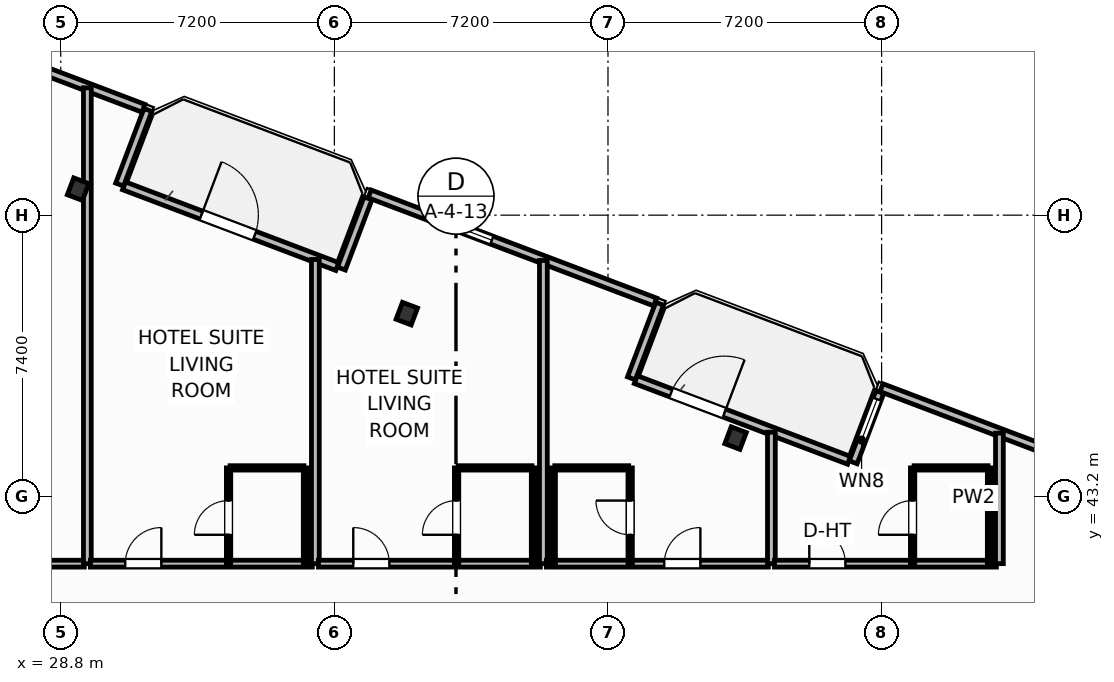
"""IFC4 building model, lengths in metres.
Left out: names, types, materials, properties, quantities, classifications, styles, units other than length and angle.
Written with IfcOpenShell. Run it as: python <this file> out.ifc"""

import sys

from ifc_helpers import new_model, si_unit, direction, frame, frame_2d, origin, origin_2d, place, context, subcontext, project, spatial, rectangle, i_section, extrude, element, fill, save


model = new_model("IFC4")
c1 = context("Model", 3, precision=1e-05, world=origin(), true_north=direction((0.0, 1.0)))
c2 = subcontext(c1, "Body", "Model", "MODEL_VIEW")
j1 = project(units=[si_unit("LENGTHUNIT", "METRE"), si_unit("PLANEANGLEUNIT", "RADIAN")], contexts=[c1])
p1 = place(None, origin())
s1 = spatial("IfcSite", under=j1, at=p1, CompositionType="ELEMENT")
p2 = place(p1, origin())
s2 = spatial("IfcBuilding", under=s1, at=p2, CompositionType="ELEMENT")
p3 = place(p2, frame((0.0, 0.0, 91.0)))
s3 = spatial("IfcBuildingStorey", under=s2, at=p3, CompositionType="ELEMENT", Elevation=91.0)
for number, where, z_axis, x_axis in (
    (1, (46.557, 44.734, 0.0), (0.0, 0.0, 1.0), (0.935, -0.354, 0.0)),
    (2, (37.906, 48.009, 0.0), (0.0, 0.0, 1.0), (0.935, -0.354, 0.0)),
    (3, (29.256, 51.284, 0.0), (0.0, 0.0, 1.0), (0.935, -0.354, 0.0)),
):
    element("IfcColumn", number, at=place(p3, frame(where, z_axis=z_axis, x_axis=x_axis)), inside=s3, PredefinedType="COLUMN", context=c2, shape_type="SweptSolid", body=[
        extrude(i_section(OverallWidth=0.424, OverallDepth=0.474, WebThickness=0.048, FlangeThickness=0.077, FilletRadius=0.025, at=origin_2d()), origin(), (0.0, 0.0, 1.0), 3.7),
    ])
p4 = place(p3, frame((30.465, 51.372, 0.0), z_axis=(0.0, 0.0, 1.0), x_axis=(0.935227640088, -0.354046976001, 0.0)))
e4 = element("IfcWall", 4, at=p4, inside=s3, PredefinedType="SOLIDWALL", context=c2, shape_type="SweptSolid", body=[
    extrude(rectangle(XDim=6.0, YDim=0.22, at=frame_2d((3.0, 0.0))), origin(), (0.0, 0.0, 1.0), 2.73),
])
p5 = place(p4, frame((2.176, 0.0, 0.0)))
e5 = element("IfcOpeningElement", 5, at=p5, cuts=e4, PredefinedType="OPENING", context=c2, shape_type="SweptSolid", body=[
    extrude(rectangle(XDim=1.5, YDim=2.25, at=frame_2d((0.75, 1.125))), frame((0.0, 0.12, 0.0), z_axis=(0.0, -1.0, 0.0), x_axis=(1.0, 0.0, 0.0)), (0.0, 0.0, 1.0), 0.24),
])
p6 = place(p3, frame((43.932, 46.273, 0.0), z_axis=(0.0, 0.0, 1.0), x_axis=(0.93521416643, -0.354082565101, 0.0)))
e6 = element("IfcWall", 6, at=p6, inside=s3, PredefinedType="SOLIDWALL", context=c2, shape_type="SweptSolid", body=[
    extrude(rectangle(XDim=6.0, YDim=0.22, at=frame_2d((3.0, 0.0))), origin(), (0.0, 0.0, 1.0), 2.73),
])
p7 = place(p6, frame((0.992, 0.0, 0.0)))
e7 = element("IfcOpeningElement", 7, at=p7, cuts=e6, PredefinedType="OPENING", context=c2, shape_type="SweptSolid", body=[
    extrude(rectangle(XDim=1.5, YDim=2.25, at=frame_2d((0.75, 1.125))), frame((0.0, 0.12, 0.0), z_axis=(0.0, -1.0, 0.0), x_axis=(1.0, 0.0, 0.0)), (0.0, 0.0, 1.0), 0.24),
])
p8 = place(p3, frame((57.91, 43.216, 0.0), z_axis=(0.0, 0.0, 1.0), x_axis=(-0.935220736163, 0.354065212427, 0.0)))
e8 = element("IfcWall", 8, at=p8, inside=s3, PredefinedType="SOLIDWALL", context=c2, shape_type="SweptSolid", body=[
    extrude(rectangle(XDim=8.035, YDim=0.22, at=frame_2d((4.018, 0.0))), origin(), (0.0, 0.0, 1.0), 2.73),
])
p9 = place(p8, frame((1.788, 0.0, 0.8)))
e9 = element("IfcOpeningElement", 9, at=p9, cuts=e8, PredefinedType="OPENING", context=c2, shape_type="SweptSolid", body=[
    extrude(rectangle(XDim=1.65, YDim=1.65, at=frame_2d((0.825, 0.825))), frame((0.0, 0.12, 0.0), z_axis=(0.0, -1.0, 0.0), x_axis=(1.0, 0.0, 0.0)), (0.0, 0.0, 1.0), 0.24),
])
p10 = place(p3, frame((50.352, 45.944, 0.0), z_axis=(0.0, 0.0, 1.0), x_axis=(-0.354061611705, -0.935222099352, 0.0)))
e10 = element("IfcWall", 10, at=p10, inside=s3, PredefinedType="SOLIDWALL", context=c2, shape_type="SweptSolid", body=[
    extrude(rectangle(XDim=1.975, YDim=0.22, at=frame_2d((0.987, 0.0))), origin(), (0.0, 0.0, 1.0), 2.73),
])
p11 = place(p10, frame((0.2, 0.0, 0.8)))
e11 = element("IfcOpeningElement", 11, at=p11, cuts=e10, PredefinedType="OPENING", context=c2, shape_type="SweptSolid", body=[
    extrude(rectangle(XDim=1.15, YDim=1.4, at=frame_2d((0.575, 0.7))), frame((0.0, 0.12, 0.0), z_axis=(0.0, -1.0, 0.0), x_axis=(1.0, 0.0, 0.0)), (0.0, 0.0, 1.0), 0.24),
])
p12 = place(p3, frame((43.817, 46.306, 0.0), z_axis=(0.0, 0.0, 1.0), x_axis=(0.353988291547, 0.935249854022, 0.0)))
e12 = element("IfcWall", 12, at=p12, inside=s3, PredefinedType="SOLIDWALL", context=c2, shape_type="SweptSolid", body=[
    extrude(rectangle(XDim=2.1, YDim=0.22, at=frame_2d((1.05, 0.0))), origin(), (0.0, 0.0, 1.0), 2.73),
])
p13 = place(p3, frame((44.443, 48.314, 0.0), z_axis=(0.0, 0.0, 1.0), x_axis=(-0.935226988293, 0.354048697735, 0.0)))
e13 = element("IfcWall", 13, at=p13, inside=s3, PredefinedType="SOLIDWALL", context=c2, shape_type="SweptSolid", body=[
    extrude(rectangle(XDim=8.035, YDim=0.22, at=frame_2d((4.018, 0.0))), origin(), (0.0, 0.0, 1.0), 2.73),
])
p14 = place(p13, frame((4.597, 0.0, 0.8)))
e14 = element("IfcOpeningElement", 14, at=p14, cuts=e13, PredefinedType="OPENING", context=c2, shape_type="SweptSolid", body=[
    extrude(rectangle(XDim=1.65, YDim=1.65, at=frame_2d((0.825, 0.825))), frame((0.0, 0.12, 0.0), z_axis=(0.0, -1.0, 0.0), x_axis=(1.0, 0.0, 0.0)), (0.0, 0.0, 1.0), 0.24),
])
p15 = place(p3, frame((36.885, 51.042, 0.0), z_axis=(0.0, 0.0, 1.0), x_axis=(-0.354128791944, -0.935196663123, 0.0)))
e15 = element("IfcWall", 15, at=p15, inside=s3, PredefinedType="SOLIDWALL", context=c2, shape_type="SweptSolid", body=[
    extrude(rectangle(XDim=1.975, YDim=0.22, at=frame_2d((0.988, 0.0))), origin(), (0.0, 0.0, 1.0), 2.73),
])
p16 = place(p3, frame((30.349, 51.405, 0.0), z_axis=(0.0, 0.0, 1.0), x_axis=(0.354128469405, 0.935196785258, 0.0)))
e16 = element("IfcWall", 16, at=p16, inside=s3, PredefinedType="SOLIDWALL", context=c2, shape_type="SweptSolid", body=[
    extrude(rectangle(XDim=2.1, YDim=0.22, at=frame_2d((1.05, 0.0))), origin(), (0.0, 0.0, 1.0), 2.73),
])
p17 = place(p3, frame((30.976, 53.413, 0.0), z_axis=(0.0, 0.0, 1.0), x_axis=(-0.935220327379, 0.354066292178, 0.0)))
e17 = element("IfcWall", 17, at=p17, inside=s3, PredefinedType="SOLIDWALL", context=c2, shape_type="SweptSolid", body=[
    extrude(rectangle(XDim=14.347, YDim=0.22, at=frame_2d((7.174, 0.0))), origin(), (0.0, 0.0, 1.0), 2.73),
])
p18 = place(p17, frame((3.555, 0.0, 0.8)))
e18 = element("IfcOpeningElement", 18, at=p18, cuts=e17, PredefinedType="OPENING", context=c2, shape_type="SweptSolid", body=[
    extrude(rectangle(XDim=1.65, YDim=1.65, at=frame_2d((0.825, 0.825))), frame((0.0, 0.12, 0.0), z_axis=(0.0, -1.0, 0.0), x_axis=(1.0, 0.0, 0.0)), (0.0, 0.0, 1.0), 0.24),
])
p19 = place(p3, frame((23.58, 41.43, 0.0), z_axis=(0.0, 0.0, 1.0), x_axis=(1.0, 0.0, 0.0)))
e19 = element("IfcWall", 19, at=p19, inside=s3, PredefinedType="PARTITIONING", context=c2, shape_type="SweptSolid", body=[
    extrude(rectangle(XDim=5.84, YDim=0.18, at=frame_2d((2.92, 0.0))), origin(), (0.0, 0.0, 1.0), 3.45),
])
p20 = place(p19, frame((3.101, 0.0, 0.0)))
e20 = element("IfcOpeningElement", 20, at=p20, cuts=e19, PredefinedType="OPENING", context=c2, shape_type="SweptSolid", body=[
    extrude(rectangle(XDim=0.95, YDim=2.15, at=frame_2d((0.475, 1.075))), frame((0.0, 0.1, 0.0), z_axis=(0.0, -1.0, 0.0), x_axis=(1.0, 0.0, 0.0)), (0.0, 0.0, 1.0), 0.2),
])
p21 = place(p3, frame((29.5, 41.43, 0.0), z_axis=(0.0, 0.0, 1.0), x_axis=(0.0, 1.0, 0.0)))
e21 = element("IfcWall", 21, at=p21, inside=s3, PredefinedType="PARTITIONING", context=c2, shape_type="SweptSolid", body=[
    extrude(rectangle(XDim=12.52, YDim=0.205, at=frame_2d((6.26, 0.0))), origin(), (0.0, 0.0, 1.0), 2.58),
])
p22 = place(p3, frame((29.58, 41.43, 0.0), z_axis=(0.0, 0.0, 1.0), x_axis=(1.0, 0.0, 0.0)))
e22 = element("IfcWall", 22, at=p22, inside=s3, PredefinedType="PARTITIONING", context=c2, shape_type="SweptSolid", body=[
    extrude(rectangle(XDim=5.84, YDim=0.18, at=frame_2d((2.92, 0.0))), origin(), (0.0, 0.0, 1.0), 3.45),
])
p23 = place(p22, frame((0.917, 0.0, 0.0)))
e23 = element("IfcOpeningElement", 23, at=p23, cuts=e22, PredefinedType="OPENING", context=c2, shape_type="SweptSolid", body=[
    extrude(rectangle(XDim=0.95, YDim=2.15, at=frame_2d((0.475, 1.075))), frame((0.0, 0.1, 0.0), z_axis=(0.0, -1.0, 0.0), x_axis=(1.0, 0.0, 0.0)), (0.0, 0.0, 1.0), 0.2),
])
p24 = place(p3, frame((33.256, 43.95, 0.0), z_axis=(0.0, 0.0, 1.0), x_axis=(1.0, 0.0, 0.0)))
e24 = element("IfcWall", 24, at=p24, inside=s3, PredefinedType="PARTITIONING", context=c2, shape_type="SweptSolid", body=[
    extrude(rectangle(XDim=1.944, YDim=0.115, at=frame_2d((0.972, 0.0))), origin(), (0.0, 0.0, 1.0), 3.45),
])
p25 = place(p3, frame((33.216, 41.43, 0.0), z_axis=(0.0, 0.0, 1.0), x_axis=(0.0, 1.0, 0.0)))
e25 = element("IfcWall", 25, at=p25, inside=s3, PredefinedType="PARTITIONING", context=c2, shape_type="SweptSolid", body=[
    extrude(rectangle(XDim=2.52, YDim=0.115, at=frame_2d((1.26, 0.0))), origin(), (0.0, 0.0, 1.0), 3.45),
])
p26 = place(p25, frame((0.76, 0.0, 0.0)))
e26 = element("IfcOpeningElement", 26, at=p26, cuts=e25, PredefinedType="OPENING", context=c2, shape_type="SweptSolid", body=[
    extrude(rectangle(XDim=0.9, YDim=2.05, at=frame_2d((0.45, 1.025))), frame((0.0, 0.067, 0.0), z_axis=(0.0, -1.0, 0.0), x_axis=(1.0, 0.0, 0.0)), (0.0, 0.0, 1.0), 0.135),
])
p27 = place(p3, frame((35.24, 41.43, 0.0), z_axis=(0.0, 0.0, 1.0), x_axis=(0.0, 1.0, 0.0)))
e27 = element("IfcWall", 27, at=p27, inside=s3, PredefinedType="PARTITIONING", context=c2, shape_type="SweptSolid", body=[
    extrude(rectangle(XDim=2.52, YDim=0.115, at=frame_2d((1.26, 0.0))), origin(), (0.0, 0.0, 1.0), 3.45),
])
p28 = place(p3, frame((35.5, 41.43, 0.0), z_axis=(0.0, 0.0, 1.0), x_axis=(0.0, 1.0, 0.0)))
e28 = element("IfcWall", 28, at=p28, inside=s3, PredefinedType="PARTITIONING", context=c2, shape_type="SweptSolid", body=[
    extrude(rectangle(XDim=8.003, YDim=0.205, at=frame_2d((4.002, 0.0))), origin(), (0.0, 0.0, 1.0), 3.45),
])
p29 = place(p3, frame((35.58, 41.43, 0.0), z_axis=(0.0, 0.0, 1.0), x_axis=(1.0, 0.0, 0.0)))
e29 = element("IfcWall", 29, at=p29, inside=s3, PredefinedType="PARTITIONING", context=c2, shape_type="SweptSolid", body=[
    extrude(rectangle(XDim=5.84, YDim=0.18, at=frame_2d((2.92, 0.0))), origin(), (0.0, 0.0, 1.0), 3.45),
])
p30 = place(p29, frame((0.917, 0.0, 0.0)))
e30 = element("IfcOpeningElement", 30, at=p30, cuts=e29, PredefinedType="OPENING", context=c2, shape_type="SweptSolid", body=[
    extrude(rectangle(XDim=0.95, YDim=2.15, at=frame_2d((0.475, 1.075))), frame((0.0, 0.1, 0.0), z_axis=(0.0, -1.0, 0.0), x_axis=(1.0, 0.0, 0.0)), (0.0, 0.0, 1.0), 0.2),
])
p31 = place(p3, frame((39.256, 43.95, 0.0), z_axis=(0.0, 0.0, 1.0), x_axis=(1.0, 0.0, 0.0)))
e31 = element("IfcWall", 31, at=p31, inside=s3, PredefinedType="PARTITIONING", context=c2, shape_type="SweptSolid", body=[
    extrude(rectangle(XDim=1.944, YDim=0.115, at=frame_2d((0.972, 0.0))), origin(), (0.0, 0.0, 1.0), 2.972),
])
p32 = place(p3, frame((39.216, 41.43, 0.0), z_axis=(0.0, 0.0, 1.0), x_axis=(0.0, 1.0, 0.0)))
e32 = element("IfcWall", 32, at=p32, inside=s3, PredefinedType="PARTITIONING", context=c2, shape_type="SweptSolid", body=[
    extrude(rectangle(XDim=2.52, YDim=0.115, at=frame_2d((1.26, 0.0))), origin(), (0.0, 0.0, 1.0), 3.45),
])
p33 = place(p32, frame((0.76, 0.0, 0.0)))
e33 = element("IfcOpeningElement", 33, at=p33, cuts=e32, PredefinedType="OPENING", context=c2, shape_type="SweptSolid", body=[
    extrude(rectangle(XDim=0.9, YDim=2.05, at=frame_2d((0.45, 1.025))), frame((0.0, 0.067, 0.0), z_axis=(0.0, -1.0, 0.0), x_axis=(1.0, 0.0, 0.0)), (0.0, 0.0, 1.0), 0.135),
])
p34 = place(p3, frame((41.24, 41.43, 0.0), z_axis=(0.0, 0.0, 1.0), x_axis=(0.0, 1.0, 0.0)))
e34 = element("IfcWall", 34, at=p34, inside=s3, PredefinedType="PARTITIONING", context=c2, shape_type="SweptSolid", body=[
    extrude(rectangle(XDim=2.52, YDim=0.115, at=frame_2d((1.26, 0.0))), origin(), (0.0, 0.0, 1.0), 3.45),
])
p35 = place(p3, frame((41.5, 41.43, 0.0), z_axis=(0.0, 0.0, 1.0), x_axis=(0.0, 1.0, 0.0)))
e35 = element("IfcWall", 35, at=p35, inside=s3, PredefinedType="PARTITIONING", context=c2, shape_type="SweptSolid", body=[
    extrude(rectangle(XDim=7.977, YDim=0.205, at=frame_2d((3.989, 0.0))), origin(), (0.0, 0.0, 1.0), 3.45),
])
p36 = place(p3, frame((41.58, 41.43, 0.0), z_axis=(0.0, 0.0, 1.0), x_axis=(1.0, 0.0, 0.0)))
e36 = element("IfcWall", 36, at=p36, inside=s3, PredefinedType="PARTITIONING", context=c2, shape_type="SweptSolid", body=[
    extrude(rectangle(XDim=5.84, YDim=0.18, at=frame_2d((2.92, 0.0))), origin(), (0.0, 0.0, 1.0), 3.45),
])
p37 = place(p36, frame((3.101, 0.0, 0.0)))
e37 = element("IfcOpeningElement", 37, at=p37, cuts=e36, PredefinedType="OPENING", context=c2, shape_type="SweptSolid", body=[
    extrude(rectangle(XDim=0.95, YDim=2.15, at=frame_2d((0.475, 1.075))), frame((0.0, 0.1, 0.0), z_axis=(0.0, -1.0, 0.0), x_axis=(1.0, 0.0, 0.0)), (0.0, 0.0, 1.0), 0.2),
])
p38 = place(p3, frame((41.8, 43.95, 0.0), z_axis=(0.0, 0.0, 1.0), x_axis=(1.0, 0.0, 0.0)))
e38 = element("IfcWall", 38, at=p38, inside=s3, PredefinedType="PARTITIONING", context=c2, shape_type="SweptSolid", body=[
    extrude(rectangle(XDim=1.944, YDim=0.115, at=frame_2d((0.972, 0.0))), origin(), (0.0, 0.0, 1.0), 3.45),
])
p39 = place(p3, frame((43.784, 41.43, 0.0), z_axis=(0.0, 0.0, 1.0), x_axis=(0.0, 1.0, 0.0)))
e39 = element("IfcWall", 39, at=p39, inside=s3, PredefinedType="PARTITIONING", context=c2, shape_type="SweptSolid", body=[
    extrude(rectangle(XDim=2.52, YDim=0.115, at=frame_2d((1.26, 0.0))), origin(), (0.0, 0.0, 1.0), 3.45),
])
p40 = place(p39, frame((0.76, 0.0, 0.0)))
e40 = element("IfcOpeningElement", 40, at=p40, cuts=e39, PredefinedType="OPENING", context=c2, shape_type="SweptSolid", body=[
    extrude(rectangle(XDim=0.9, YDim=2.05, at=frame_2d((0.45, 1.025))), frame((0.0, 0.067, 0.0), z_axis=(0.0, -1.0, 0.0), x_axis=(1.0, 0.0, 0.0)), (0.0, 0.0, 1.0), 0.135),
])
p41 = place(p3, frame((41.76, 41.43, 0.0), z_axis=(0.0, 0.0, 1.0), x_axis=(0.0, 1.0, 0.0)))
e41 = element("IfcWall", 41, at=p41, inside=s3, PredefinedType="PARTITIONING", context=c2, shape_type="SweptSolid", body=[
    extrude(rectangle(XDim=2.52, YDim=0.115, at=frame_2d((1.26, 0.0))), origin(), (0.0, 0.0, 1.0), 3.45),
])
p42 = place(p3, frame((47.5, 41.43, 0.0), z_axis=(0.0, 0.0, 1.0), x_axis=(0.0, 1.0, 0.0)))
e42 = element("IfcWall", 42, at=p42, inside=s3, PredefinedType="PARTITIONING", context=c2, shape_type="SweptSolid", body=[
    extrude(rectangle(XDim=3.46, YDim=0.205, at=frame_2d((1.73, 0.0))), origin(), (0.0, 0.0, 1.0), 3.45),
])
p43 = place(p3, frame((47.58, 41.43, 0.0), z_axis=(0.0, 0.0, 1.0), x_axis=(1.0, 0.0, 0.0)))
e43 = element("IfcWall", 43, at=p43, inside=s3, PredefinedType="PARTITIONING", context=c2, shape_type="SweptSolid", body=[
    extrude(rectangle(XDim=5.84, YDim=0.18, at=frame_2d((2.92, 0.0))), origin(), (0.0, 0.0, 1.0), 3.45),
])
p44 = place(p43, frame((0.917, 0.0, 0.0)))
e44 = element("IfcOpeningElement", 44, at=p44, cuts=e43, PredefinedType="OPENING", context=c2, shape_type="SweptSolid", body=[
    extrude(rectangle(XDim=0.95, YDim=2.15, at=frame_2d((0.475, 1.075))), frame((0.0, 0.1, 0.0), z_axis=(0.0, -1.0, 0.0), x_axis=(1.0, 0.0, 0.0)), (0.0, 0.0, 1.0), 0.2),
])
p45 = place(p3, frame((51.256, 43.95, 0.0), z_axis=(0.0, 0.0, 1.0), x_axis=(1.0, 0.0, 0.0)))
e45 = element("IfcWall", 45, at=p45, inside=s3, PredefinedType="PARTITIONING", context=c2, shape_type="SweptSolid", body=[
    extrude(rectangle(XDim=1.944, YDim=0.115, at=frame_2d((0.972, 0.0))), origin(), (0.0, 0.0, 1.0), 3.45),
])
p46 = place(p3, frame((51.216, 41.43, 0.0), z_axis=(0.0, 0.0, 1.0), x_axis=(0.0, 1.0, 0.0)))
e46 = element("IfcWall", 46, at=p46, inside=s3, PredefinedType="PARTITIONING", context=c2, shape_type="SweptSolid", body=[
    extrude(rectangle(XDim=2.52, YDim=0.115, at=frame_2d((1.26, 0.0))), origin(), (0.0, 0.0, 1.0), 3.45),
])
p47 = place(p46, frame((0.76, 0.0, 0.0)))
e47 = element("IfcOpeningElement", 47, at=p47, cuts=e46, PredefinedType="OPENING", context=c2, shape_type="SweptSolid", body=[
    extrude(rectangle(XDim=0.9, YDim=2.05, at=frame_2d((0.45, 1.025))), frame((0.0, 0.067, 0.0), z_axis=(0.0, -1.0, 0.0), x_axis=(1.0, 0.0, 0.0)), (0.0, 0.0, 1.0), 0.135),
])
p48 = place(p3, frame((53.24, 41.43, 0.0), z_axis=(0.0, 0.0, 1.0), x_axis=(0.0, 1.0, 0.0)))
e48 = element("IfcWall", 48, at=p48, inside=s3, PredefinedType="PARTITIONING", context=c2, shape_type="SweptSolid", body=[
    extrude(rectangle(XDim=2.52, YDim=0.115, at=frame_2d((1.26, 0.0))), origin(), (0.0, 0.0, 1.0), 3.45),
])
p49 = place(p3, frame((53.5, 41.43, 0.0), z_axis=(0.0, 0.0, 1.0), x_axis=(0.0, 1.0, 0.0)))
e49 = element("IfcWall", 49, at=p49, inside=s3, PredefinedType="PARTITIONING", context=c2, shape_type="SweptSolid", body=[
    extrude(rectangle(XDim=3.434, YDim=0.205, at=frame_2d((1.717, 0.0))), origin(), (0.0, 0.0, 1.0), 3.45),
])
p50 = place(p5, origin())
e50 = element("IfcDoor", 50, at=p50, inside=s3, OperationType="SINGLE_SWING_LEFT", PredefinedType="DOOR", context=c2, shape_type="SweptSolid", body=[
    extrude(rectangle(XDim=1.5, YDim=2.25, at=frame_2d((0.75, 1.125))), frame((0.0, 0.025, 0.0), z_axis=(0.0, -1.0, 0.0), x_axis=(1.0, 0.0, 0.0)), (0.0, 0.0, 1.0), 0.05),
])
fill(e5, e50)
p51 = place(p7, origin())
e51 = element("IfcDoor", 51, at=p51, inside=s3, OperationType="SINGLE_SWING_RIGHT", PredefinedType="DOOR", context=c2, shape_type="SweptSolid", body=[
    extrude(rectangle(XDim=1.5, YDim=2.25, at=frame_2d((0.75, 1.125))), frame((0.0, 0.025, 0.0), z_axis=(0.0, -1.0, 0.0), x_axis=(1.0, 0.0, 0.0)), (0.0, 0.0, 1.0), 0.05),
])
fill(e7, e51)
p52 = place(p14, origin())
e52 = element("IfcWindow", 52, at=p52, inside=s3, PartitioningType="SINGLE_PANEL", PredefinedType="WINDOW", context=c2, shape_type="SweptSolid", body=[
    extrude(rectangle(XDim=1.65, YDim=1.65, at=frame_2d((0.825, 0.825))), frame((0.0, 0.03, 0.0), z_axis=(0.0, -1.0, 0.0), x_axis=(1.0, 0.0, 0.0)), (0.0, 0.0, 1.0), 0.06),
])
fill(e14, e52)
p53 = place(p23, origin())
e53 = element("IfcDoor", 53, at=p53, inside=s3, OperationType="SINGLE_SWING_RIGHT", PredefinedType="DOOR", context=c2, shape_type="SweptSolid", body=[
    extrude(rectangle(XDim=0.95, YDim=2.15, at=frame_2d((0.475, 1.075))), frame((0.0, 0.025, 0.0), z_axis=(0.0, -1.0, 0.0), x_axis=(1.0, 0.0, 0.0)), (0.0, 0.0, 1.0), 0.05),
])
fill(e23, e53)
p54 = place(p26, origin())
e54 = element("IfcDoor", 54, at=p54, inside=s3, OperationType="SINGLE_SWING_LEFT", PredefinedType="DOOR", context=c2, shape_type="SweptSolid", body=[
    extrude(rectangle(XDim=0.9, YDim=2.05, at=frame_2d((0.45, 1.025))), frame((0.0, 0.025, 0.0), z_axis=(0.0, -1.0, 0.0), x_axis=(1.0, 0.0, 0.0)), (0.0, 0.0, 1.0), 0.05),
])
fill(e26, e54)
p55 = place(p30, origin())
e55 = element("IfcDoor", 55, at=p55, inside=s3, OperationType="SINGLE_SWING_LEFT", PredefinedType="DOOR", context=c2, shape_type="SweptSolid", body=[
    extrude(rectangle(XDim=0.95, YDim=2.15, at=frame_2d((0.475, 1.075))), frame((0.0, 0.025, 0.0), z_axis=(0.0, -1.0, 0.0), x_axis=(1.0, 0.0, 0.0)), (0.0, 0.0, 1.0), 0.05),
])
fill(e30, e55)
p56 = place(p33, origin())
e56 = element("IfcDoor", 56, at=p56, inside=s3, OperationType="SINGLE_SWING_LEFT", PredefinedType="DOOR", context=c2, shape_type="SweptSolid", body=[
    extrude(rectangle(XDim=0.9, YDim=2.05, at=frame_2d((0.45, 1.025))), frame((0.0, 0.025, 0.0), z_axis=(0.0, -1.0, 0.0), x_axis=(1.0, 0.0, 0.0)), (0.0, 0.0, 1.0), 0.05),
])
fill(e33, e56)
p57 = place(p37, origin())
e57 = element("IfcDoor", 57, at=p57, inside=s3, OperationType="SINGLE_SWING_RIGHT", PredefinedType="DOOR", context=c2, shape_type="SweptSolid", body=[
    extrude(rectangle(XDim=0.95, YDim=2.15, at=frame_2d((0.475, 1.075))), frame((0.0, 0.025, 0.0), z_axis=(0.0, -1.0, 0.0), x_axis=(1.0, 0.0, 0.0)), (0.0, 0.0, 1.0), 0.05),
])
fill(e37, e57)
p58 = place(p40, origin())
e58 = element("IfcDoor", 58, at=p58, inside=s3, OperationType="SINGLE_SWING_RIGHT", PredefinedType="DOOR", context=c2, shape_type="SweptSolid", body=[
    extrude(rectangle(XDim=0.9, YDim=2.05, at=frame_2d((0.45, 1.025))), frame((0.0, 0.025, 0.0), z_axis=(0.0, -1.0, 0.0), x_axis=(1.0, 0.0, 0.0)), (0.0, 0.0, 1.0), 0.05),
])
fill(e40, e58)
p59 = place(p44, origin())
e59 = element("IfcDoor", 59, at=p59, inside=s3, OperationType="SINGLE_SWING_LEFT", PredefinedType="DOOR", context=c2, shape_type="SweptSolid", body=[
    extrude(rectangle(XDim=0.95, YDim=2.15, at=frame_2d((0.475, 1.075))), frame((0.0, 0.025, 0.0), z_axis=(0.0, -1.0, 0.0), x_axis=(1.0, 0.0, 0.0)), (0.0, 0.0, 1.0), 0.05),
])
fill(e44, e59)
p60 = place(p47, origin())
e60 = element("IfcDoor", 60, at=p60, inside=s3, OperationType="SINGLE_SWING_LEFT", PredefinedType="DOOR", context=c2, shape_type="SweptSolid", body=[
    extrude(rectangle(XDim=0.9, YDim=2.05, at=frame_2d((0.45, 1.025))), frame((0.0, 0.025, 0.0), z_axis=(0.0, -1.0, 0.0), x_axis=(1.0, 0.0, 0.0)), (0.0, 0.0, 1.0), 0.05),
])
fill(e47, e60)
p61 = place(p11, origin())
e61 = element("IfcWindow", 61, at=p61, inside=s3, PartitioningType="SINGLE_PANEL", PredefinedType="WINDOW", context=c2, shape_type="SweptSolid", body=[
    extrude(rectangle(XDim=1.15, YDim=1.4, at=frame_2d((0.575, 0.7))), frame((0.0, 0.03, 0.0), z_axis=(0.0, -1.0, 0.0), x_axis=(1.0, 0.0, 0.0)), (0.0, 0.0, 1.0), 0.06),
])
fill(e11, e61)
save(model, sys.argv[1])
